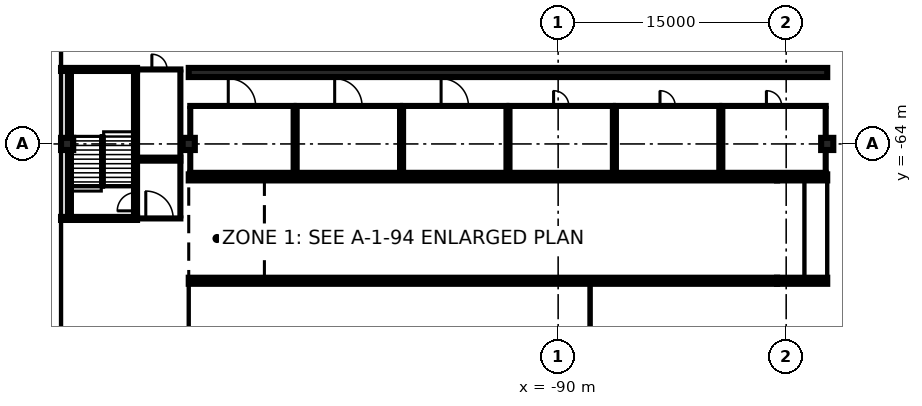
"""IFC4 building model, lengths in metres.
Left out: names, types, materials, properties, quantities, classifications, styles, units other than length and angle.
Written with IfcOpenShell. Run it as: python <this file> out.ifc"""

import sys

from ifc_helpers import new_model, si_unit, direction, frame, frame_2d, origin, origin_2d, place, context, subcontext, project, spatial, rectangle, extrude, element, fill, save


model = new_model("IFC4")
c1 = context("Model", 3, precision=1e-05, world=origin(), true_north=direction((0.0, 1.0)))
c2 = subcontext(c1, "Body", "Model", "MODEL_VIEW")
j1 = project(units=[si_unit("LENGTHUNIT", "METRE"), si_unit("PLANEANGLEUNIT", "RADIAN")], contexts=[c1])
p1 = place(None, origin())
s1 = spatial("IfcSite", under=j1, at=p1, CompositionType="ELEMENT")
p2 = place(p1, origin())
s2 = spatial("IfcBuilding", under=s1, at=p2, CompositionType="ELEMENT")
p3 = place(p2, frame((0.0, 0.0, -12.0)))
s3 = spatial("IfcBuildingStorey", under=s2, at=p3, CompositionType="ELEMENT", Elevation=-12.0)
p4 = place(p3, frame((-123.15, -80.0, 0.0), z_axis=(0.0, 0.0, 1.0), x_axis=(0.0, 1.0, 0.0)))
e1 = element("IfcWall", 1, at=p4, inside=s3, PredefinedType="USERDEFINED", context=c2, shape_type="SweptSolid", body=[
    extrude(rectangle(XDim=160.0, YDim=0.9, at=frame_2d((80.0, 0.0))), origin(), (0.0, 0.0, 1.0), 11.55),
])
p5 = place(p2, frame((0.0, 0.0, -7.2)))
s4 = spatial("IfcBuildingStorey", under=s2, at=p5, CompositionType="ELEMENT", Elevation=-7.2)
for number, where, z_axis, x_axis in (
    (2, (-122.3, -64.0, -0.4), (0.0, 0.0, 1.0), (1.0, 0.0, 0.0)),
    (3, (-114.3, -64.0, -0.4), (0.0, 0.0, 1.0), (1.0, 0.0, 0.0)),
    (4, (-72.3, -64.0, -0.4), (0.0, 0.0, 1.0), (1.0, 0.0, 0.0)),
):
    element("IfcColumn", number, at=place(p5, frame(where, z_axis=z_axis, x_axis=x_axis)), inside=s4, PredefinedType="COLUMN", context=c2, shape_type="SweptSolid", body=[
        extrude(rectangle(XDim=0.8, YDim=0.8, at=origin_2d()), origin(), (0.0, 0.0, 1.0), 3.6),
    ])
p6 = place(p5, frame((-114.3, -65.9, 0.0), z_axis=(0.0, 0.0, 1.0), x_axis=(1.0, 0.0, 0.0)))
e5 = element("IfcWall", 5, at=p6, inside=s4, PredefinedType="PARTITIONING", context=c2, shape_type="SweptSolid", body=[
    extrude(rectangle(XDim=7.0, YDim=0.2, at=frame_2d((3.5, 0.0))), origin(), (0.0, 0.0, 1.0), 3.2),
])
p7 = place(p5, frame((-114.3, -61.5, 0.0), z_axis=(0.0, 0.0, 1.0), x_axis=(1.0, 0.0, 0.0)))
e6 = element("IfcWall", 6, at=p7, inside=s4, PredefinedType="PARTITIONING", context=c2, shape_type="SweptSolid", body=[
    extrude(rectangle(XDim=7.0, YDim=0.2, at=frame_2d((3.5, 0.0))), origin(), (0.0, 0.0, 1.0), 3.2),
])
p8 = place(p7, frame((2.6, 0.0, 0.0)))
e7 = element("IfcOpeningElement", 7, at=p8, cuts=e6, PredefinedType="OPENING", context=c2, shape_type="SweptSolid", body=[
    extrude(rectangle(XDim=1.8, YDim=2.1, at=frame_2d((0.9, 1.05))), frame((0.0, 0.11, 0.0), z_axis=(0.0, -1.0, 0.0), x_axis=(1.0, 0.0, 0.0)), (0.0, 0.0, 1.0), 0.22),
])
p9 = place(p5, frame((-114.2, -65.8, 0.0), z_axis=(0.0, 0.0, 1.0), x_axis=(0.0, 1.0, 0.0)))
e8 = element("IfcWall", 8, at=p9, inside=s4, PredefinedType="PARTITIONING", context=c2, shape_type="SweptSolid", body=[
    extrude(rectangle(XDim=1.4, YDim=0.2, at=frame_2d((0.7, 0.0))), origin(), (0.0, 0.0, 1.0), 3.2),
])
p10 = place(p5, frame((-114.2, -63.6, 0.0), z_axis=(0.0, 0.0, 1.0), x_axis=(0.0, 1.0, 0.0)))
e9 = element("IfcWall", 9, at=p10, inside=s4, PredefinedType="PARTITIONING", context=c2, shape_type="SweptSolid", body=[
    extrude(rectangle(XDim=2.0, YDim=0.2, at=frame_2d((1.0, 0.0))), origin(), (0.0, 0.0, 1.0), 3.2),
])
p11 = place(p5, frame((-107.4, -65.8, 0.0), z_axis=(0.0, 0.0, 1.0), x_axis=(0.0, 1.0, 0.0)))
e10 = element("IfcWall", 10, at=p11, inside=s4, PredefinedType="PARTITIONING", context=c2, shape_type="SweptSolid", body=[
    extrude(rectangle(XDim=4.2, YDim=0.2, at=frame_2d((2.1, 0.0))), origin(), (0.0, 0.0, 1.0), 3.2),
])
p12 = place(p5, frame((-107.3, -65.9, 0.0), z_axis=(0.0, 0.0, 1.0), x_axis=(1.0, 0.0, 0.0)))
e11 = element("IfcWall", 11, at=p12, inside=s4, PredefinedType="PARTITIONING", context=c2, shape_type="SweptSolid", body=[
    extrude(rectangle(XDim=7.0, YDim=0.2, at=frame_2d((3.5, 0.0))), origin(), (0.0, 0.0, 1.0), 3.2),
])
p13 = place(p5, frame((-107.3, -61.5, 0.0), z_axis=(0.0, 0.0, 1.0), x_axis=(1.0, 0.0, 0.0)))
e12 = element("IfcWall", 12, at=p13, inside=s4, PredefinedType="PARTITIONING", context=c2, shape_type="SweptSolid", body=[
    extrude(rectangle(XDim=7.0, YDim=0.2, at=frame_2d((3.5, 0.0))), origin(), (0.0, 0.0, 1.0), 3.2),
])
p14 = place(p13, frame((2.6, 0.0, 0.0)))
e13 = element("IfcOpeningElement", 13, at=p14, cuts=e12, PredefinedType="OPENING", context=c2, shape_type="SweptSolid", body=[
    extrude(rectangle(XDim=1.8, YDim=2.1, at=frame_2d((0.9, 1.05))), frame((0.0, 0.11, 0.0), z_axis=(0.0, -1.0, 0.0), x_axis=(1.0, 0.0, 0.0)), (0.0, 0.0, 1.0), 0.22),
])
for number, where, z_axis, x_axis in (
    (14, (-107.2, -65.8, 0.0), (0.0, 0.0, 1.0), (0.0, 1.0, 0.0)),
    (15, (-100.4, -65.8, 0.0), (0.0, 0.0, 1.0), (0.0, 1.0, 0.0)),
):
    element("IfcWall", number, at=place(p5, frame(where, z_axis=z_axis, x_axis=x_axis)), inside=s4, PredefinedType="PARTITIONING", context=c2, shape_type="SweptSolid", body=[
        extrude(rectangle(XDim=4.2, YDim=0.2, at=frame_2d((2.1, 0.0))), origin(), (0.0, 0.0, 1.0), 3.2),
    ])
p15 = place(p5, frame((-100.3, -65.9, 0.0), z_axis=(0.0, 0.0, 1.0), x_axis=(1.0, 0.0, 0.0)))
e16 = element("IfcWall", 16, at=p15, inside=s4, PredefinedType="PARTITIONING", context=c2, shape_type="SweptSolid", body=[
    extrude(rectangle(XDim=7.0, YDim=0.2, at=frame_2d((3.5, 0.0))), origin(), (0.0, 0.0, 1.0), 3.2),
])
p16 = place(p5, frame((-100.3, -61.5, 0.0), z_axis=(0.0, 0.0, 1.0), x_axis=(1.0, 0.0, 0.0)))
e17 = element("IfcWall", 17, at=p16, inside=s4, PredefinedType="PARTITIONING", context=c2, shape_type="SweptSolid", body=[
    extrude(rectangle(XDim=7.0, YDim=0.2, at=frame_2d((3.5, 0.0))), origin(), (0.0, 0.0, 1.0), 3.2),
])
p17 = place(p16, frame((2.6, 0.0, 0.0)))
e18 = element("IfcOpeningElement", 18, at=p17, cuts=e17, PredefinedType="OPENING", context=c2, shape_type="SweptSolid", body=[
    extrude(rectangle(XDim=1.8, YDim=2.1, at=frame_2d((0.9, 1.05))), frame((0.0, 0.11, 0.0), z_axis=(0.0, -1.0, 0.0), x_axis=(1.0, 0.0, 0.0)), (0.0, 0.0, 1.0), 0.22),
])
for number, where, z_axis, x_axis in (
    (19, (-100.2, -65.8, 0.0), (0.0, 0.0, 1.0), (0.0, 1.0, 0.0)),
    (20, (-93.4, -65.8, 0.0), (0.0, 0.0, 1.0), (0.0, 1.0, 0.0)),
):
    element("IfcWall", number, at=place(p5, frame(where, z_axis=z_axis, x_axis=x_axis)), inside=s4, PredefinedType="PARTITIONING", context=c2, shape_type="SweptSolid", body=[
        extrude(rectangle(XDim=4.2, YDim=0.2, at=frame_2d((2.1, 0.0))), origin(), (0.0, 0.0, 1.0), 3.2),
    ])
p18 = place(p5, frame((-93.3, -65.9, 0.0), z_axis=(0.0, 0.0, 1.0), x_axis=(1.0, 0.0, 0.0)))
e21 = element("IfcWall", 21, at=p18, inside=s4, PredefinedType="PARTITIONING", context=c2, shape_type="SweptSolid", body=[
    extrude(rectangle(XDim=7.0, YDim=0.2, at=frame_2d((3.5, 0.0))), origin(), (0.0, 0.0, 1.0), 3.2),
])
p19 = place(p5, frame((-93.3, -61.5, 0.0), z_axis=(0.0, 0.0, 1.0), x_axis=(1.0, 0.0, 0.0)))
e22 = element("IfcWall", 22, at=p19, inside=s4, PredefinedType="PARTITIONING", context=c2, shape_type="SweptSolid", body=[
    extrude(rectangle(XDim=7.0, YDim=0.2, at=frame_2d((3.5, 0.0))), origin(), (0.0, 0.0, 1.0), 3.2),
])
p20 = place(p19, frame((3.0, 0.0, 0.0)))
e23 = element("IfcOpeningElement", 23, at=p20, cuts=e22, PredefinedType="OPENING", context=c2, shape_type="SweptSolid", body=[
    extrude(rectangle(XDim=1.0, YDim=2.1, at=frame_2d((0.5, 1.05))), frame((0.0, 0.11, 0.0), z_axis=(0.0, -1.0, 0.0), x_axis=(1.0, 0.0, 0.0)), (0.0, 0.0, 1.0), 0.22),
])
for number, where, z_axis, x_axis in (
    (24, (-93.2, -65.8, 0.0), (0.0, 0.0, 1.0), (0.0, 1.0, 0.0)),
    (25, (-86.4, -65.8, 0.0), (0.0, 0.0, 1.0), (0.0, 1.0, 0.0)),
):
    element("IfcWall", number, at=place(p5, frame(where, z_axis=z_axis, x_axis=x_axis)), inside=s4, PredefinedType="PARTITIONING", context=c2, shape_type="SweptSolid", body=[
        extrude(rectangle(XDim=4.2, YDim=0.2, at=frame_2d((2.1, 0.0))), origin(), (0.0, 0.0, 1.0), 3.2),
    ])
p21 = place(p5, frame((-86.3, -65.9, 0.0), z_axis=(0.0, 0.0, 1.0), x_axis=(1.0, 0.0, 0.0)))
e26 = element("IfcWall", 26, at=p21, inside=s4, PredefinedType="PARTITIONING", context=c2, shape_type="SweptSolid", body=[
    extrude(rectangle(XDim=7.0, YDim=0.2, at=frame_2d((3.5, 0.0))), origin(), (0.0, 0.0, 1.0), 3.2),
])
p22 = place(p5, frame((-86.3, -61.5, 0.0), z_axis=(0.0, 0.0, 1.0), x_axis=(1.0, 0.0, 0.0)))
e27 = element("IfcWall", 27, at=p22, inside=s4, PredefinedType="PARTITIONING", context=c2, shape_type="SweptSolid", body=[
    extrude(rectangle(XDim=7.0, YDim=0.2, at=frame_2d((3.5, 0.0))), origin(), (0.0, 0.0, 1.0), 3.2),
])
p23 = place(p22, frame((3.0, 0.0, 0.0)))
e28 = element("IfcOpeningElement", 28, at=p23, cuts=e27, PredefinedType="OPENING", context=c2, shape_type="SweptSolid", body=[
    extrude(rectangle(XDim=1.0, YDim=2.1, at=frame_2d((0.5, 1.05))), frame((0.0, 0.11, 0.0), z_axis=(0.0, -1.0, 0.0), x_axis=(1.0, 0.0, 0.0)), (0.0, 0.0, 1.0), 0.22),
])
for number, where, z_axis, x_axis in (
    (29, (-86.2, -65.8, 0.0), (0.0, 0.0, 1.0), (0.0, 1.0, 0.0)),
    (30, (-79.4, -65.8, 0.0), (0.0, 0.0, 1.0), (0.0, 1.0, 0.0)),
):
    element("IfcWall", number, at=place(p5, frame(where, z_axis=z_axis, x_axis=x_axis)), inside=s4, PredefinedType="PARTITIONING", context=c2, shape_type="SweptSolid", body=[
        extrude(rectangle(XDim=4.2, YDim=0.2, at=frame_2d((2.1, 0.0))), origin(), (0.0, 0.0, 1.0), 3.2),
    ])
p24 = place(p5, frame((-79.3, -65.9, 0.0), z_axis=(0.0, 0.0, 1.0), x_axis=(1.0, 0.0, 0.0)))
e31 = element("IfcWall", 31, at=p24, inside=s4, PredefinedType="PARTITIONING", context=c2, shape_type="SweptSolid", body=[
    extrude(rectangle(XDim=7.0, YDim=0.2, at=frame_2d((3.5, 0.0))), origin(), (0.0, 0.0, 1.0), 3.2),
])
p25 = place(p5, frame((-79.3, -61.5, 0.0), z_axis=(0.0, 0.0, 1.0), x_axis=(1.0, 0.0, 0.0)))
e32 = element("IfcWall", 32, at=p25, inside=s4, PredefinedType="PARTITIONING", context=c2, shape_type="SweptSolid", body=[
    extrude(rectangle(XDim=7.0, YDim=0.2, at=frame_2d((3.5, 0.0))), origin(), (0.0, 0.0, 1.0), 3.2),
])
p26 = place(p25, frame((3.0, 0.0, 0.0)))
e33 = element("IfcOpeningElement", 33, at=p26, cuts=e32, PredefinedType="OPENING", context=c2, shape_type="SweptSolid", body=[
    extrude(rectangle(XDim=1.0, YDim=2.1, at=frame_2d((0.5, 1.05))), frame((0.0, 0.11, 0.0), z_axis=(0.0, -1.0, 0.0), x_axis=(1.0, 0.0, 0.0)), (0.0, 0.0, 1.0), 0.22),
])
p27 = place(p5, frame((-79.2, -65.8, 0.0), z_axis=(0.0, 0.0, 1.0), x_axis=(0.0, 1.0, 0.0)))
e34 = element("IfcWall", 34, at=p27, inside=s4, PredefinedType="PARTITIONING", context=c2, shape_type="SweptSolid", body=[
    extrude(rectangle(XDim=4.2, YDim=0.2, at=frame_2d((2.1, 0.0))), origin(), (0.0, 0.0, 1.0), 3.2),
])
p28 = place(p5, frame((-72.4, -65.8, 0.0), z_axis=(0.0, 0.0, 1.0), x_axis=(0.0, 1.0, 0.0)))
e35 = element("IfcWall", 35, at=p28, inside=s4, PredefinedType="PARTITIONING", context=c2, shape_type="SweptSolid", body=[
    extrude(rectangle(XDim=1.4, YDim=0.2, at=frame_2d((0.7, 0.0))), origin(), (0.0, 0.0, 1.0), 3.2),
])
p29 = place(p5, frame((-72.4, -63.6, 0.0), z_axis=(0.0, 0.0, 1.0), x_axis=(0.0, 1.0, 0.0)))
e36 = element("IfcWall", 36, at=p29, inside=s4, PredefinedType="PARTITIONING", context=c2, shape_type="SweptSolid", body=[
    extrude(rectangle(XDim=2.0, YDim=0.2, at=frame_2d((1.0, 0.0))), origin(), (0.0, 0.0, 1.0), 3.2),
])
p30 = place(p5, frame((-117.7, -68.9, 0.0), z_axis=(0.0, 0.0, 1.0), x_axis=(1.0, 0.0, 0.0)))
e37 = element("IfcWall", 37, at=p30, inside=s4, PredefinedType="PARTITIONING", context=c2, shape_type="SweptSolid", body=[
    extrude(rectangle(XDim=2.95, YDim=0.2, at=frame_2d((1.475, 0.0))), origin(), (0.0, 0.0, 1.0), 3.2),
])
p31 = place(p30, frame((0.575, 0.0, 0.0)))
e38 = element("IfcOpeningElement", 38, at=p31, cuts=e37, PredefinedType="OPENING", context=c2, shape_type="SweptSolid", body=[
    extrude(rectangle(XDim=1.8, YDim=2.1, at=frame_2d((0.9, 1.05))), frame((0.0, 0.11, 0.0), z_axis=(0.0, -1.0, 0.0), x_axis=(1.0, 0.0, 0.0)), (0.0, 0.0, 1.0), 0.22),
])
p32 = place(p5, frame((-117.7, -65.1, 0.0), z_axis=(0.0, 0.0, 1.0), x_axis=(1.0, 0.0, 0.0)))
e39 = element("IfcWall", 39, at=p32, inside=s4, PredefinedType="PARTITIONING", context=c2, shape_type="SweptSolid", body=[
    extrude(rectangle(XDim=2.95, YDim=0.2, at=frame_2d((1.475, 0.0))), origin(), (0.0, 0.0, 1.0), 3.2),
])
p33 = place(p5, frame((-114.85, -68.8, 0.0), z_axis=(0.0, 0.0, 1.0), x_axis=(0.0, 1.0, 0.0)))
e40 = element("IfcWall", 40, at=p33, inside=s4, PredefinedType="PARTITIONING", context=c2, shape_type="SweptSolid", body=[
    extrude(rectangle(XDim=3.6, YDim=0.2, at=frame_2d((1.8, 0.0))), origin(), (0.0, 0.0, 1.0), 3.2),
])
p34 = place(p5, frame((-117.7, -64.9, 0.0), z_axis=(0.0, 0.0, 1.0), x_axis=(1.0, 0.0, 0.0)))
e41 = element("IfcWall", 41, at=p34, inside=s4, PredefinedType="PARTITIONING", context=c2, shape_type="SweptSolid", body=[
    extrude(rectangle(XDim=2.95, YDim=0.2, at=frame_2d((1.475, 0.0))), origin(), (0.0, 0.0, 1.0), 3.2),
])
p35 = place(p5, frame((-117.7, -59.1, 0.0), z_axis=(0.0, 0.0, 1.0), x_axis=(1.0, 0.0, 0.0)))
e42 = element("IfcWall", 42, at=p35, inside=s4, PredefinedType="PARTITIONING", context=c2, shape_type="SweptSolid", body=[
    extrude(rectangle(XDim=2.95, YDim=0.2, at=frame_2d((1.475, 0.0))), origin(), (0.0, 0.0, 1.0), 3.2),
])
p36 = place(p35, frame((0.975, 0.0, 0.0)))
e43 = element("IfcOpeningElement", 43, at=p36, cuts=e42, PredefinedType="OPENING", context=c2, shape_type="SweptSolid", body=[
    extrude(rectangle(XDim=1.0, YDim=2.1, at=frame_2d((0.5, 1.05))), frame((0.0, 0.11, 0.0), z_axis=(0.0, -1.0, 0.0), x_axis=(1.0, 0.0, 0.0)), (0.0, 0.0, 1.0), 0.22),
])
p37 = place(p5, frame((-114.85, -64.8, 0.0), z_axis=(0.0, 0.0, 1.0), x_axis=(0.0, 1.0, 0.0)))
e44 = element("IfcWall", 44, at=p37, inside=s4, PredefinedType="PARTITIONING", context=c2, shape_type="SweptSolid", body=[
    extrude(rectangle(XDim=5.6, YDim=0.2, at=frame_2d((2.8, 0.0))), origin(), (0.0, 0.0, 1.0), 3.2),
])
p38 = place(p5, frame((-122.15, -68.8, 0.0), z_axis=(0.0, 0.0, 1.0), x_axis=(0.0, 1.0, 0.0)))
e45 = element("IfcWall", 45, at=p38, inside=s4, PredefinedType="SOLIDWALL", context=c2, shape_type="SweptSolid", body=[
    extrude(rectangle(XDim=9.6, YDim=0.2, at=frame_2d((4.8, 0.0))), origin(), (0.0, 0.0, 1.0), 3.2),
])
p39 = place(p5, frame((-117.8, -68.8, 0.0), z_axis=(0.0, 0.0, 1.0), x_axis=(0.0, 1.0, 0.0)))
e46 = element("IfcWall", 46, at=p39, inside=s4, PredefinedType="SOLIDWALL", context=c2, shape_type="SweptSolid", body=[
    extrude(rectangle(XDim=9.6, YDim=0.2, at=frame_2d((4.8, 0.0))), origin(), (0.0, 0.0, 1.0), 3.2),
])
p40 = place(p39, frame((0.4, 0.0, 0.0)))
e47 = element("IfcOpeningElement", 47, at=p40, cuts=e46, PredefinedType="OPENING", context=c2, shape_type="SweptSolid", body=[
    extrude(rectangle(XDim=1.2, YDim=2.1, at=frame_2d((0.6, 1.05))), frame((0.0, 0.11, 0.0), z_axis=(0.0, -1.0, 0.0), x_axis=(1.0, 0.0, 0.0)), (0.0, 0.0, 1.0), 0.22),
])
for number, where, z_axis, x_axis in (
    (48, (-117.7, -68.9, 0.0), (0.0, 0.0, 1.0), (-1.0, 0.0, 0.0)),
    (49, (-122.7, -59.1, 0.0), (0.0, 0.0, 1.0), (1.0, 0.0, 0.0)),
):
    element("IfcWall", number, at=place(p5, frame(where, z_axis=z_axis, x_axis=x_axis)), inside=s4, PredefinedType="SOLIDWALL", context=c2, shape_type="SweptSolid", body=[
        extrude(rectangle(XDim=5.0, YDim=0.2, at=frame_2d((2.5, 0.0))), origin(), (0.0, 0.0, 1.0), 3.2),
    ])
p41 = place(p5, frame((-114.3, -73.0, 0.0), z_axis=(0.0, 0.0, 1.0), x_axis=(1.0, 0.0, 0.0)))
e50 = element("IfcWall", 50, at=p41, inside=s4, PredefinedType="SOLIDWALL", context=c2, shape_type="SweptSolid", body=[
    extrude(rectangle(XDim=38.7, YDim=0.4, at=frame_2d((19.35, 0.0))), origin(), (0.0, 0.0, 1.0), 3.2),
])
p42 = place(p5, frame((-75.6, -73.0, 0.0), z_axis=(0.0, 0.0, 1.0), x_axis=(1.0, 0.0, 0.0)))
e51 = element("IfcWall", 51, at=p42, inside=s4, PredefinedType="SOLIDWALL", context=c2, shape_type="SweptSolid", body=[
    extrude(rectangle(XDim=3.3, YDim=0.4, at=frame_2d((1.65, 0.0))), origin(), (0.0, 0.0, 1.0), 3.2),
])
p43 = place(p5, frame((-114.3, -66.2, 0.0), z_axis=(0.0, 0.0, 1.0), x_axis=(1.0, 0.0, 0.0)))
e52 = element("IfcWall", 52, at=p43, inside=s4, PredefinedType="SOLIDWALL", context=c2, shape_type="SweptSolid", body=[
    extrude(rectangle(XDim=38.7, YDim=0.4, at=frame_2d((19.35, 0.0))), origin(), (0.0, 0.0, 1.0), 3.2),
])
p44 = place(p5, frame((-75.6, -66.2, 0.0), z_axis=(0.0, 0.0, 1.0), x_axis=(1.0, 0.0, 0.0)))
e53 = element("IfcWall", 53, at=p44, inside=s4, PredefinedType="SOLIDWALL", context=c2, shape_type="SweptSolid", body=[
    extrude(rectangle(XDim=3.3, YDim=0.4, at=frame_2d((1.65, 0.0))), origin(), (0.0, 0.0, 1.0), 3.2),
])
p45 = place(p5, frame((-114.3, -59.3, 0.0), z_axis=(0.0, 0.0, 1.0), x_axis=(1.0, 0.0, 0.0)))
e54 = element("IfcWall", 54, at=p45, inside=s4, PredefinedType="SOLIDWALL", context=c2, shape_type="SweptSolid", body=[
    extrude(rectangle(XDim=42.0, YDim=0.6, at=frame_2d((21.0, 0.0))), origin(), (0.0, 0.0, 1.0), 3.2),
])
p46 = place(p8, origin())
e55 = element("IfcDoor", 55, at=p46, inside=s4, OperationType="DOUBLE_DOOR_SINGLE_SWING", PredefinedType="DOOR", context=c2, shape_type="SweptSolid", body=[
    extrude(rectangle(XDim=1.8, YDim=2.1, at=frame_2d((0.9, 1.05))), frame((0.0, 0.025, 0.0), z_axis=(0.0, -1.0, 0.0), x_axis=(1.0, 0.0, 0.0)), (0.0, 0.0, 1.0), 0.05),
])
fill(e7, e55)
p47 = place(p14, origin())
e56 = element("IfcDoor", 56, at=p47, inside=s4, OperationType="DOUBLE_DOOR_SINGLE_SWING", PredefinedType="DOOR", context=c2, shape_type="SweptSolid", body=[
    extrude(rectangle(XDim=1.8, YDim=2.1, at=frame_2d((0.9, 1.05))), frame((0.0, 0.025, 0.0), z_axis=(0.0, -1.0, 0.0), x_axis=(1.0, 0.0, 0.0)), (0.0, 0.0, 1.0), 0.05),
])
fill(e13, e56)
p48 = place(p17, origin())
e57 = element("IfcDoor", 57, at=p48, inside=s4, OperationType="DOUBLE_DOOR_SINGLE_SWING", PredefinedType="DOOR", context=c2, shape_type="SweptSolid", body=[
    extrude(rectangle(XDim=1.8, YDim=2.1, at=frame_2d((0.9, 1.05))), frame((0.0, 0.025, 0.0), z_axis=(0.0, -1.0, 0.0), x_axis=(1.0, 0.0, 0.0)), (0.0, 0.0, 1.0), 0.05),
])
fill(e18, e57)
p49 = place(p20, origin())
e58 = element("IfcDoor", 58, at=p49, inside=s4, OperationType="SINGLE_SWING_LEFT", PredefinedType="DOOR", context=c2, shape_type="SweptSolid", body=[
    extrude(rectangle(XDim=1.0, YDim=2.1, at=frame_2d((0.5, 1.05))), frame((0.0, 0.025, 0.0), z_axis=(0.0, -1.0, 0.0), x_axis=(1.0, 0.0, 0.0)), (0.0, 0.0, 1.0), 0.05),
])
fill(e23, e58)
p50 = place(p23, origin())
e59 = element("IfcDoor", 59, at=p50, inside=s4, OperationType="SINGLE_SWING_LEFT", PredefinedType="DOOR", context=c2, shape_type="SweptSolid", body=[
    extrude(rectangle(XDim=1.0, YDim=2.1, at=frame_2d((0.5, 1.05))), frame((0.0, 0.025, 0.0), z_axis=(0.0, -1.0, 0.0), x_axis=(1.0, 0.0, 0.0)), (0.0, 0.0, 1.0), 0.05),
])
fill(e28, e59)
p51 = place(p26, origin())
e60 = element("IfcDoor", 60, at=p51, inside=s4, OperationType="SINGLE_SWING_LEFT", PredefinedType="DOOR", context=c2, shape_type="SweptSolid", body=[
    extrude(rectangle(XDim=1.0, YDim=2.1, at=frame_2d((0.5, 1.05))), frame((0.0, 0.025, 0.0), z_axis=(0.0, -1.0, 0.0), x_axis=(1.0, 0.0, 0.0)), (0.0, 0.0, 1.0), 0.05),
])
fill(e33, e60)
p52 = place(p31, origin())
e61 = element("IfcDoor", 61, at=p52, inside=s4, OperationType="DOUBLE_DOOR_SINGLE_SWING", PredefinedType="DOOR", context=c2, shape_type="SweptSolid", body=[
    extrude(rectangle(XDim=1.8, YDim=2.1, at=frame_2d((0.9, 1.05))), frame((0.0, 0.025, 0.0), z_axis=(0.0, -1.0, 0.0), x_axis=(1.0, 0.0, 0.0)), (0.0, 0.0, 1.0), 0.05),
])
fill(e38, e61)
p53 = place(p36, origin())
e62 = element("IfcDoor", 62, at=p53, inside=s4, OperationType="SINGLE_SWING_LEFT", PredefinedType="DOOR", context=c2, shape_type="SweptSolid", body=[
    extrude(rectangle(XDim=1.0, YDim=2.1, at=frame_2d((0.5, 1.05))), frame((0.0, 0.025, 0.0), z_axis=(0.0, -1.0, 0.0), x_axis=(1.0, 0.0, 0.0)), (0.0, 0.0, 1.0), 0.05),
])
fill(e43, e62)
p54 = place(p40, origin())
e63 = element("IfcDoor", 63, at=p54, inside=s4, OperationType="SINGLE_SWING_LEFT", PredefinedType="DOOR", context=c2, shape_type="SweptSolid", body=[
    extrude(rectangle(XDim=1.2, YDim=2.1, at=frame_2d((0.6, 1.05))), frame((0.0, 0.025, 0.0), z_axis=(0.0, -1.0, 0.0), x_axis=(1.0, 0.0, 0.0)), (0.0, 0.0, 1.0), 0.05),
])
fill(e47, e63)
save(model, sys.argv[1])
